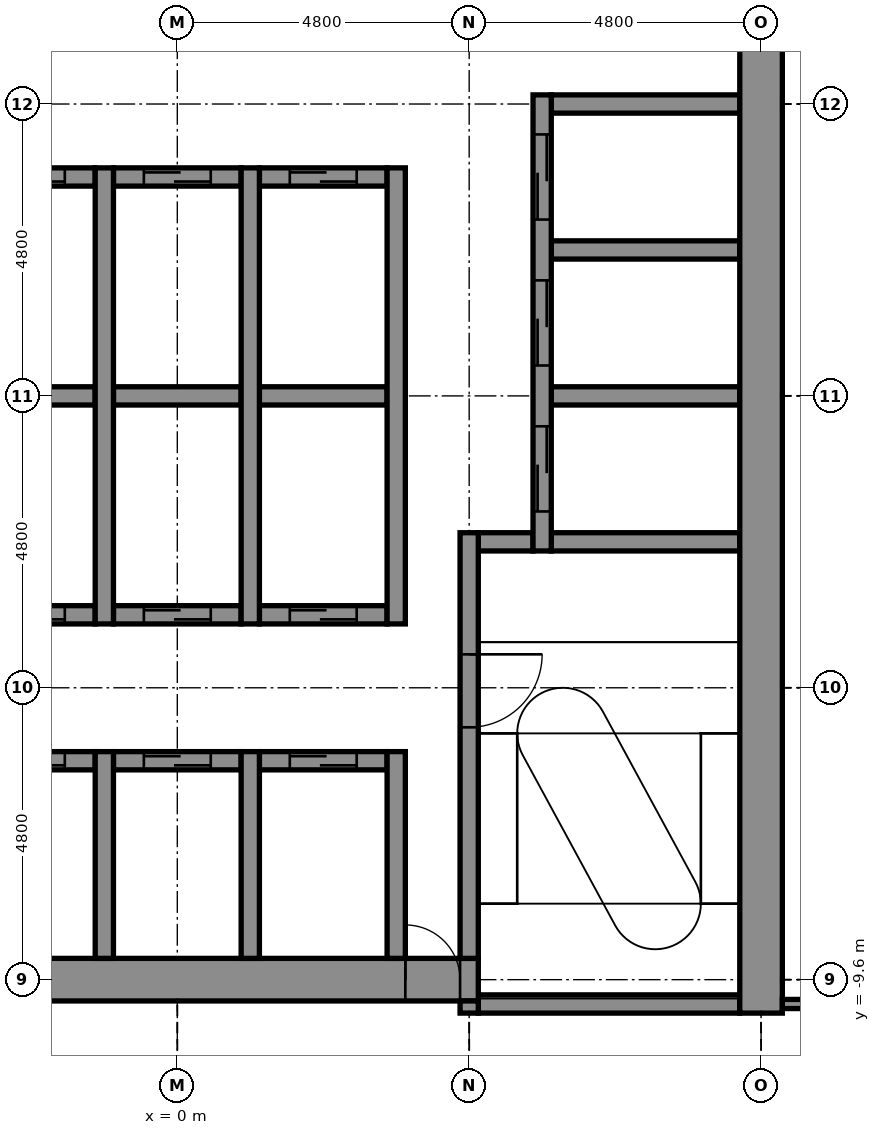
"""IFC4 building model, lengths in metres.
Left out: names, types, materials, properties, quantities, classifications, styles, units other than length and angle.
Written with IfcOpenShell. Run it as: python <this file> out.ifc"""

import sys

from ifc_helpers import new_model, si_unit, direction, frame, frame_2d, origin, place, context, subcontext, project, spatial, rectangle, extrude, element, fill, save


model = new_model("IFC4")
c1 = context("Model", 3, precision=1e-05, world=origin(), true_north=direction((0.0, 1.0)))
c2 = subcontext(c1, "Body", "Model", "MODEL_VIEW")
j1 = project(units=[si_unit("LENGTHUNIT", "METRE"), si_unit("PLANEANGLEUNIT", "RADIAN")], contexts=[c1])
p1 = place(None, origin())
s1 = spatial("IfcSite", under=j1, at=p1, CompositionType="ELEMENT")
p2 = place(p1, origin())
s2 = spatial("IfcBuilding", under=s1, at=p2, CompositionType="ELEMENT")
p3 = place(p2, frame((0.0, 0.0, 166.1)))
s3 = spatial("IfcBuildingStorey", under=s2, at=p3, CompositionType="ELEMENT", Elevation=166.1)
p4 = place(p3, frame((4.95, -10.0, -0.15), z_axis=(0.0, 0.0, 1.0), x_axis=(1.0, 0.0, 0.0)))
e1 = element("IfcWall", 1, at=p4, inside=s3, PredefinedType="STANDARD", context=c2, shape_type="SweptSolid", body=[
    extrude(rectangle(XDim=4.3, YDim=0.3, at=frame_2d((2.15, 0.0))), origin(), (0.0, 0.0, 1.0), 3.9),
])
p5 = place(p3, frame((-5.25, -9.6, -0.15), z_axis=(0.0, 0.0, 1.0), x_axis=(1.0, 0.0, 0.0)))
e2 = element("IfcWall", 2, at=p5, inside=s3, PredefinedType="SHEAR", context=c2, shape_type="SweptSolid", body=[
    extrude(rectangle(XDim=10.2, YDim=0.7, at=frame_2d((5.1, 0.0))), origin(), (0.0, 0.0, 1.0), 3.9),
])
p6 = place(p5, frame((9.0, 0.0, 0.15)))
e3 = element("IfcOpeningElement", 3, at=p6, cuts=e2, PredefinedType="OPENING", context=c2, shape_type="SweptSolid", body=[
    extrude(rectangle(XDim=0.9, YDim=2.1, at=frame_2d((0.45, 1.05))), frame((0.0, 0.36, 0.0), z_axis=(0.0, -1.0, 0.0), x_axis=(1.0, 0.0, 0.0)), (0.0, 0.0, 1.0), 0.72),
])
p7 = place(p3, frame((-3.45, -6.0, -0.15), z_axis=(0.0, 0.0, 1.0), x_axis=(1.0, 0.0, 0.0)))
e4 = element("IfcWall", 4, at=p7, inside=s3, PredefinedType="STANDARD", context=c2, shape_type="SweptSolid", body=[
    extrude(rectangle(XDim=2.1, YDim=0.3, at=frame_2d((1.05, 0.0))), origin(), (0.0, 0.0, 1.0), 3.9),
])
p8 = place(p7, frame((0.5, 0.0, 0.15)))
e5 = element("IfcOpeningElement", 5, at=p8, cuts=e4, PredefinedType="OPENING", context=c2, shape_type="SweptSolid", body=[
    extrude(rectangle(XDim=1.1, YDim=2.1, at=frame_2d((0.55, 1.05))), frame((0.0, 0.16, 0.0), z_axis=(0.0, -1.0, 0.0), x_axis=(1.0, 0.0, 0.0)), (0.0, 0.0, 1.0), 0.32),
])
p9 = place(p3, frame((-1.05, -6.0, -0.15), z_axis=(0.0, 0.0, 1.0), x_axis=(1.0, 0.0, 0.0)))
e6 = element("IfcWall", 6, at=p9, inside=s3, PredefinedType="STANDARD", context=c2, shape_type="SweptSolid", body=[
    extrude(rectangle(XDim=2.1, YDim=0.3, at=frame_2d((1.05, 0.0))), origin(), (0.0, 0.0, 1.0), 3.9),
])
p10 = place(p9, frame((0.5, 0.0, 0.15)))
e7 = element("IfcOpeningElement", 7, at=p10, cuts=e6, PredefinedType="OPENING", context=c2, shape_type="SweptSolid", body=[
    extrude(rectangle(XDim=1.1, YDim=2.1, at=frame_2d((0.55, 1.05))), frame((0.0, 0.16, 0.0), z_axis=(0.0, -1.0, 0.0), x_axis=(1.0, 0.0, 0.0)), (0.0, 0.0, 1.0), 0.32),
])
p11 = place(p3, frame((1.35, -6.0, -0.15), z_axis=(0.0, 0.0, 1.0), x_axis=(1.0, 0.0, 0.0)))
e8 = element("IfcWall", 8, at=p11, inside=s3, PredefinedType="STANDARD", context=c2, shape_type="SweptSolid", body=[
    extrude(rectangle(XDim=2.1, YDim=0.3, at=frame_2d((1.05, 0.0))), origin(), (0.0, 0.0, 1.0), 3.9),
])
p12 = place(p11, frame((0.5, 0.0, 0.15)))
e9 = element("IfcOpeningElement", 9, at=p12, cuts=e8, PredefinedType="OPENING", context=c2, shape_type="SweptSolid", body=[
    extrude(rectangle(XDim=1.1, YDim=2.1, at=frame_2d((0.55, 1.05))), frame((0.0, 0.16, 0.0), z_axis=(0.0, -1.0, 0.0), x_axis=(1.0, 0.0, 0.0)), (0.0, 0.0, 1.0), 0.32),
])
p13 = place(p3, frame((-3.45, -3.6, -0.15), z_axis=(0.0, 0.0, 1.0), x_axis=(1.0, 0.0, 0.0)))
e10 = element("IfcWall", 10, at=p13, inside=s3, PredefinedType="STANDARD", context=c2, shape_type="SweptSolid", body=[
    extrude(rectangle(XDim=2.1, YDim=0.3, at=frame_2d((1.05, 0.0))), origin(), (0.0, 0.0, 1.0), 3.9),
])
p14 = place(p13, frame((0.5, 0.0, 0.15)))
e11 = element("IfcOpeningElement", 11, at=p14, cuts=e10, PredefinedType="OPENING", context=c2, shape_type="SweptSolid", body=[
    extrude(rectangle(XDim=1.1, YDim=2.1, at=frame_2d((0.55, 1.05))), frame((0.0, 0.16, 0.0), z_axis=(0.0, -1.0, 0.0), x_axis=(1.0, 0.0, 0.0)), (0.0, 0.0, 1.0), 0.32),
])
p15 = place(p3, frame((-1.05, -3.6, -0.15), z_axis=(0.0, 0.0, 1.0), x_axis=(1.0, 0.0, 0.0)))
e12 = element("IfcWall", 12, at=p15, inside=s3, PredefinedType="STANDARD", context=c2, shape_type="SweptSolid", body=[
    extrude(rectangle(XDim=2.1, YDim=0.3, at=frame_2d((1.05, 0.0))), origin(), (0.0, 0.0, 1.0), 3.9),
])
p16 = place(p15, frame((0.5, 0.0, 0.15)))
e13 = element("IfcOpeningElement", 13, at=p16, cuts=e12, PredefinedType="OPENING", context=c2, shape_type="SweptSolid", body=[
    extrude(rectangle(XDim=1.1, YDim=2.1, at=frame_2d((0.55, 1.05))), frame((0.0, 0.16, 0.0), z_axis=(0.0, -1.0, 0.0), x_axis=(1.0, 0.0, 0.0)), (0.0, 0.0, 1.0), 0.32),
])
p17 = place(p3, frame((1.35, -3.6, -0.15), z_axis=(0.0, 0.0, 1.0), x_axis=(1.0, 0.0, 0.0)))
e14 = element("IfcWall", 14, at=p17, inside=s3, PredefinedType="STANDARD", context=c2, shape_type="SweptSolid", body=[
    extrude(rectangle(XDim=2.1, YDim=0.3, at=frame_2d((1.05, 0.0))), origin(), (0.0, 0.0, 1.0), 3.9),
])
p18 = place(p17, frame((0.5, 0.0, 0.15)))
e15 = element("IfcOpeningElement", 15, at=p18, cuts=e14, PredefinedType="OPENING", context=c2, shape_type="SweptSolid", body=[
    extrude(rectangle(XDim=1.1, YDim=2.1, at=frame_2d((0.55, 1.05))), frame((0.0, 0.16, 0.0), z_axis=(0.0, -1.0, 0.0), x_axis=(1.0, 0.0, 0.0)), (0.0, 0.0, 1.0), 0.32),
])
p19 = place(p3, frame((4.95, -2.4, -0.15), z_axis=(0.0, 0.0, 1.0), x_axis=(1.0, 0.0, 0.0)))
e16 = element("IfcWall", 16, at=p19, inside=s3, PredefinedType="STANDARD", context=c2, shape_type="SweptSolid", body=[
    extrude(rectangle(XDim=0.9, YDim=0.3, at=frame_2d((0.45, 0.0))), origin(), (0.0, 0.0, 1.0), 3.9),
])
p20 = place(p3, frame((6.15, -2.4, -0.15), z_axis=(0.0, 0.0, 1.0), x_axis=(1.0, 0.0, 0.0)))
e17 = element("IfcWall", 17, at=p20, inside=s3, PredefinedType="STANDARD", context=c2, shape_type="SweptSolid", body=[
    extrude(rectangle(XDim=3.1, YDim=0.3, at=frame_2d((1.55, 0.0))), origin(), (0.0, 0.0, 1.0), 3.9),
])
p21 = place(p3, frame((-3.45, 0.0, -0.15), z_axis=(0.0, 0.0, 1.0), x_axis=(1.0, 0.0, 0.0)))
e18 = element("IfcWall", 18, at=p21, inside=s3, PredefinedType="STANDARD", context=c2, shape_type="SweptSolid", body=[
    extrude(rectangle(XDim=2.1, YDim=0.3, at=frame_2d((1.05, 0.0))), origin(), (0.0, 0.0, 1.0), 3.9),
])
p22 = place(p3, frame((-1.05, 0.0, -0.15), z_axis=(0.0, 0.0, 1.0), x_axis=(1.0, 0.0, 0.0)))
e19 = element("IfcWall", 19, at=p22, inside=s3, PredefinedType="STANDARD", context=c2, shape_type="SweptSolid", body=[
    extrude(rectangle(XDim=2.1, YDim=0.3, at=frame_2d((1.05, 0.0))), origin(), (0.0, 0.0, 1.0), 3.9),
])
p23 = place(p3, frame((1.35, 0.0, -0.15), z_axis=(0.0, 0.0, 1.0), x_axis=(1.0, 0.0, 0.0)))
e20 = element("IfcWall", 20, at=p23, inside=s3, PredefinedType="STANDARD", context=c2, shape_type="SweptSolid", body=[
    extrude(rectangle(XDim=2.1, YDim=0.3, at=frame_2d((1.05, 0.0))), origin(), (0.0, 0.0, 1.0), 3.9),
])
for number, where, z_axis, x_axis in (
    (21, (6.15, 0.0, -0.15), (0.0, 0.0, 1.0), (1.0, 0.0, 0.0)),
    (22, (6.15, 2.4, -0.15), (0.0, 0.0, 1.0), (1.0, 0.0, 0.0)),
):
    element("IfcWall", number, at=place(p3, frame(where, z_axis=z_axis, x_axis=x_axis)), inside=s3, PredefinedType="STANDARD", context=c2, shape_type="SweptSolid", body=[
        extrude(rectangle(XDim=3.1, YDim=0.3, at=frame_2d((1.55, 0.0))), origin(), (0.0, 0.0, 1.0), 3.9),
    ])
p24 = place(p3, frame((-3.45, 3.6, -0.15), z_axis=(0.0, 0.0, 1.0), x_axis=(1.0, 0.0, 0.0)))
e23 = element("IfcWall", 23, at=p24, inside=s3, PredefinedType="STANDARD", context=c2, shape_type="SweptSolid", body=[
    extrude(rectangle(XDim=2.1, YDim=0.3, at=frame_2d((1.05, 0.0))), origin(), (0.0, 0.0, 1.0), 3.9),
])
p25 = place(p24, frame((0.5, 0.0, 0.15)))
e24 = element("IfcOpeningElement", 24, at=p25, cuts=e23, PredefinedType="OPENING", context=c2, shape_type="SweptSolid", body=[
    extrude(rectangle(XDim=1.1, YDim=2.1, at=frame_2d((0.55, 1.05))), frame((0.0, 0.16, 0.0), z_axis=(0.0, -1.0, 0.0), x_axis=(1.0, 0.0, 0.0)), (0.0, 0.0, 1.0), 0.32),
])
p26 = place(p3, frame((-1.05, 3.6, -0.15), z_axis=(0.0, 0.0, 1.0), x_axis=(1.0, 0.0, 0.0)))
e25 = element("IfcWall", 25, at=p26, inside=s3, PredefinedType="STANDARD", context=c2, shape_type="SweptSolid", body=[
    extrude(rectangle(XDim=2.1, YDim=0.3, at=frame_2d((1.05, 0.0))), origin(), (0.0, 0.0, 1.0), 3.9),
])
p27 = place(p26, frame((0.5, 0.0, 0.15)))
e26 = element("IfcOpeningElement", 26, at=p27, cuts=e25, PredefinedType="OPENING", context=c2, shape_type="SweptSolid", body=[
    extrude(rectangle(XDim=1.1, YDim=2.1, at=frame_2d((0.55, 1.05))), frame((0.0, 0.16, 0.0), z_axis=(0.0, -1.0, 0.0), x_axis=(1.0, 0.0, 0.0)), (0.0, 0.0, 1.0), 0.32),
])
p28 = place(p3, frame((1.35, 3.6, -0.15), z_axis=(0.0, 0.0, 1.0), x_axis=(1.0, 0.0, 0.0)))
e27 = element("IfcWall", 27, at=p28, inside=s3, PredefinedType="STANDARD", context=c2, shape_type="SweptSolid", body=[
    extrude(rectangle(XDim=2.1, YDim=0.3, at=frame_2d((1.05, 0.0))), origin(), (0.0, 0.0, 1.0), 3.9),
])
p29 = place(p28, frame((0.5, 0.0, 0.15)))
e28 = element("IfcOpeningElement", 28, at=p29, cuts=e27, PredefinedType="OPENING", context=c2, shape_type="SweptSolid", body=[
    extrude(rectangle(XDim=1.1, YDim=2.1, at=frame_2d((0.55, 1.05))), frame((0.0, 0.16, 0.0), z_axis=(0.0, -1.0, 0.0), x_axis=(1.0, 0.0, 0.0)), (0.0, 0.0, 1.0), 0.32),
])
p30 = place(p3, frame((6.15, 4.8, -0.15), z_axis=(0.0, 0.0, 1.0), x_axis=(1.0, 0.0, 0.0)))
e29 = element("IfcWall", 29, at=p30, inside=s3, PredefinedType="STANDARD", context=c2, shape_type="SweptSolid", body=[
    extrude(rectangle(XDim=3.1, YDim=0.3, at=frame_2d((1.55, 0.0))), origin(), (0.0, 0.0, 1.0), 3.9),
])
p31 = place(p3, frame((-1.2, -9.25, -0.15), z_axis=(0.0, 0.0, 1.0), x_axis=(0.0, 1.0, 0.0)))
e30 = element("IfcWall", 30, at=p31, inside=s3, PredefinedType="STANDARD", context=c2, shape_type="SweptSolid", body=[
    extrude(rectangle(XDim=3.4, YDim=0.3, at=frame_2d((1.7, 0.0))), origin(), (0.0, 0.0, 1.0), 3.9),
])
p32 = place(p3, frame((-1.2, -3.75, -0.15), z_axis=(0.0, 0.0, 1.0), x_axis=(0.0, 1.0, 0.0)))
e31 = element("IfcWall", 31, at=p32, inside=s3, PredefinedType="STANDARD", context=c2, shape_type="SweptSolid", body=[
    extrude(rectangle(XDim=7.5, YDim=0.3, at=frame_2d((3.75, 0.0))), origin(), (0.0, 0.0, 1.0), 3.9),
])
p33 = place(p3, frame((1.2, -9.25, -0.15), z_axis=(0.0, 0.0, 1.0), x_axis=(0.0, 1.0, 0.0)))
e32 = element("IfcWall", 32, at=p33, inside=s3, PredefinedType="STANDARD", context=c2, shape_type="SweptSolid", body=[
    extrude(rectangle(XDim=3.4, YDim=0.3, at=frame_2d((1.7, 0.0))), origin(), (0.0, 0.0, 1.0), 3.9),
])
p34 = place(p3, frame((1.2, -3.75, -0.15), z_axis=(0.0, 0.0, 1.0), x_axis=(0.0, 1.0, 0.0)))
e33 = element("IfcWall", 33, at=p34, inside=s3, PredefinedType="STANDARD", context=c2, shape_type="SweptSolid", body=[
    extrude(rectangle(XDim=7.5, YDim=0.3, at=frame_2d((3.75, 0.0))), origin(), (0.0, 0.0, 1.0), 3.9),
])
p35 = place(p3, frame((3.6, -9.25, -0.15), z_axis=(0.0, 0.0, 1.0), x_axis=(0.0, 1.0, 0.0)))
e34 = element("IfcWall", 34, at=p35, inside=s3, PredefinedType="STANDARD", context=c2, shape_type="SweptSolid", body=[
    extrude(rectangle(XDim=3.4, YDim=0.3, at=frame_2d((1.7, 0.0))), origin(), (0.0, 0.0, 1.0), 3.9),
])
p36 = place(p3, frame((3.6, -3.75, -0.15), z_axis=(0.0, 0.0, 1.0), x_axis=(0.0, 1.0, 0.0)))
e35 = element("IfcWall", 35, at=p36, inside=s3, PredefinedType="STANDARD", context=c2, shape_type="SweptSolid", body=[
    extrude(rectangle(XDim=7.5, YDim=0.3, at=frame_2d((3.75, 0.0))), origin(), (0.0, 0.0, 1.0), 3.9),
])
p37 = place(p3, frame((4.8, -10.15, -0.15), z_axis=(0.0, 0.0, 1.0), x_axis=(0.0, 1.0, 0.0)))
e36 = element("IfcWall", 36, at=p37, inside=s3, PredefinedType="STANDARD", context=c2, shape_type="SweptSolid", body=[
    extrude(rectangle(XDim=0.2, YDim=0.3, at=frame_2d((0.1, 0.0))), origin(), (0.0, 0.0, 1.0), 3.9),
])
p38 = place(p3, frame((4.8, -9.25, -0.15), z_axis=(0.0, 0.0, 1.0), x_axis=(0.0, 1.0, 0.0)))
e37 = element("IfcWall", 37, at=p38, inside=s3, PredefinedType="STANDARD", context=c2, shape_type="SweptSolid", body=[
    extrude(rectangle(XDim=7.0, YDim=0.3, at=frame_2d((3.5, 0.0))), origin(), (0.0, 0.0, 1.0), 3.9),
])
p39 = place(p38, frame((3.8, 0.0, 0.15)))
e38 = element("IfcOpeningElement", 38, at=p39, cuts=e37, PredefinedType="OPENING", context=c2, shape_type="SweptSolid", body=[
    extrude(rectangle(XDim=1.2, YDim=2.1, at=frame_2d((0.6, 1.05))), frame((0.0, 0.16, 0.0), z_axis=(0.0, -1.0, 0.0), x_axis=(1.0, 0.0, 0.0)), (0.0, 0.0, 1.0), 0.32),
])
p40 = place(p3, frame((6.0, -2.55, -0.15), z_axis=(0.0, 0.0, 1.0), x_axis=(0.0, 1.0, 0.0)))
e39 = element("IfcWall", 39, at=p40, inside=s3, PredefinedType="STANDARD", context=c2, shape_type="SweptSolid", body=[
    extrude(rectangle(XDim=7.5, YDim=0.3, at=frame_2d((3.75, 0.0))), origin(), (0.0, 0.0, 1.0), 3.9),
])
p41 = place(p40, frame((0.65, 0.0, 0.15)))
e40 = element("IfcOpeningElement", 40, at=p41, cuts=e39, PredefinedType="OPENING", context=c2, shape_type="SweptSolid", body=[
    extrude(rectangle(XDim=1.4, YDim=2.1, at=frame_2d((0.7, 1.05))), frame((0.0, 0.16, 0.0), z_axis=(0.0, -1.0, 0.0), x_axis=(1.0, 0.0, 0.0)), (0.0, 0.0, 1.0), 0.32),
])
p42 = place(p40, frame((3.05, 0.0, 0.15)))
e41 = element("IfcOpeningElement", 41, at=p42, cuts=e39, PredefinedType="OPENING", context=c2, shape_type="SweptSolid", body=[
    extrude(rectangle(XDim=1.4, YDim=2.1, at=frame_2d((0.7, 1.05))), frame((0.0, 0.16, 0.0), z_axis=(0.0, -1.0, 0.0), x_axis=(1.0, 0.0, 0.0)), (0.0, 0.0, 1.0), 0.32),
])
p43 = place(p40, frame((5.45, 0.0, 0.15)))
e42 = element("IfcOpeningElement", 42, at=p43, cuts=e39, PredefinedType="OPENING", context=c2, shape_type="SweptSolid", body=[
    extrude(rectangle(XDim=1.4, YDim=2.1, at=frame_2d((0.7, 1.05))), frame((0.0, 0.16, 0.0), z_axis=(0.0, -1.0, 0.0), x_axis=(1.0, 0.0, 0.0)), (0.0, 0.0, 1.0), 0.32),
])
p44 = place(p3, frame((9.6, -10.15, -0.15), z_axis=(0.0, 0.0, 1.0), x_axis=(0.0, 1.0, 0.0)))
e43 = element("IfcWall", 43, at=p44, inside=s3, PredefinedType="SHEAR", context=c2, shape_type="SweptSolid", body=[
    extrude(rectangle(XDim=20.1, YDim=0.7, at=frame_2d((10.05, 0.0))), origin(), (0.0, 0.0, 1.0), 3.9),
])
p45 = place(p3, frame((9.95, -10.0, 0.0), z_axis=(0.0, 0.0, 1.0), x_axis=(1.0, 0.0, 0.0)))
e44 = element("IfcWall", 44, at=p45, inside=s3, PredefinedType="PARTITIONING", context=c2, shape_type="SweptSolid", body=[
    extrude(rectangle(XDim=9.405, YDim=0.15, at=frame_2d((4.702, 0.0))), origin(), (0.0, 0.0, 1.0), 3.75),
])
p46 = place(p45, frame((2.569, 0.0, 0.0)))
e45 = element("IfcOpeningElement", 45, at=p46, cuts=e44, PredefinedType="OPENING", context=c2, shape_type="SweptSolid", body=[
    extrude(rectangle(XDim=1.8, YDim=2.1, at=frame_2d((0.9, 1.05))), frame((0.0, 0.085, 0.0), z_axis=(0.0, -1.0, 0.0), x_axis=(1.0, 0.0, 0.0)), (0.0, 0.0, 1.0), 0.17),
])
p47 = place(p41, origin())
e46 = element("IfcDoor", 46, at=p47, inside=s3, OperationType="DOUBLE_DOOR_SLIDING", PredefinedType="DOOR", context=c2, shape_type="SweptSolid", body=[
    extrude(rectangle(XDim=1.4, YDim=2.1, at=frame_2d((0.7, 1.05))), frame((0.0, 0.025, 0.0), z_axis=(0.0, -1.0, 0.0), x_axis=(1.0, 0.0, 0.0)), (0.0, 0.0, 1.0), 0.05),
])
fill(e40, e46)
p48 = place(p42, origin())
e47 = element("IfcDoor", 47, at=p48, inside=s3, OperationType="DOUBLE_DOOR_SLIDING", PredefinedType="DOOR", context=c2, shape_type="SweptSolid", body=[
    extrude(rectangle(XDim=1.4, YDim=2.1, at=frame_2d((0.7, 1.05))), frame((0.0, 0.025, 0.0), z_axis=(0.0, -1.0, 0.0), x_axis=(1.0, 0.0, 0.0)), (0.0, 0.0, 1.0), 0.05),
])
fill(e41, e47)
p49 = place(p43, origin())
e48 = element("IfcDoor", 48, at=p49, inside=s3, OperationType="DOUBLE_DOOR_SLIDING", PredefinedType="DOOR", context=c2, shape_type="SweptSolid", body=[
    extrude(rectangle(XDim=1.4, YDim=2.1, at=frame_2d((0.7, 1.05))), frame((0.0, 0.025, 0.0), z_axis=(0.0, -1.0, 0.0), x_axis=(1.0, 0.0, 0.0)), (0.0, 0.0, 1.0), 0.05),
])
fill(e42, e48)
p50 = place(p25, origin())
e49 = element("IfcDoor", 49, at=p50, inside=s3, OperationType="DOUBLE_DOOR_SLIDING", PredefinedType="DOOR", context=c2, shape_type="SweptSolid", body=[
    extrude(rectangle(XDim=1.1, YDim=2.1, at=frame_2d((0.55, 1.05))), frame((0.0, 0.025, 0.0), z_axis=(0.0, -1.0, 0.0), x_axis=(1.0, 0.0, 0.0)), (0.0, 0.0, 1.0), 0.05),
])
fill(e24, e49)
p51 = place(p27, origin())
e50 = element("IfcDoor", 50, at=p51, inside=s3, OperationType="DOUBLE_DOOR_SLIDING", PredefinedType="DOOR", context=c2, shape_type="SweptSolid", body=[
    extrude(rectangle(XDim=1.1, YDim=2.1, at=frame_2d((0.55, 1.05))), frame((0.0, 0.025, 0.0), z_axis=(0.0, -1.0, 0.0), x_axis=(1.0, 0.0, 0.0)), (0.0, 0.0, 1.0), 0.05),
])
fill(e26, e50)
p52 = place(p29, origin())
e51 = element("IfcDoor", 51, at=p52, inside=s3, OperationType="DOUBLE_DOOR_SLIDING", PredefinedType="DOOR", context=c2, shape_type="SweptSolid", body=[
    extrude(rectangle(XDim=1.1, YDim=2.1, at=frame_2d((0.55, 1.05))), frame((0.0, 0.025, 0.0), z_axis=(0.0, -1.0, 0.0), x_axis=(1.0, 0.0, 0.0)), (0.0, 0.0, 1.0), 0.05),
])
fill(e28, e51)
p53 = place(p14, origin())
e52 = element("IfcDoor", 52, at=p53, inside=s3, OperationType="DOUBLE_DOOR_SLIDING", PredefinedType="DOOR", context=c2, shape_type="SweptSolid", body=[
    extrude(rectangle(XDim=1.1, YDim=2.1, at=frame_2d((0.55, 1.05))), frame((0.0, 0.025, 0.0), z_axis=(0.0, -1.0, 0.0), x_axis=(1.0, 0.0, 0.0)), (0.0, 0.0, 1.0), 0.05),
])
fill(e11, e52)
p54 = place(p16, origin())
e53 = element("IfcDoor", 53, at=p54, inside=s3, OperationType="DOUBLE_DOOR_SLIDING", PredefinedType="DOOR", context=c2, shape_type="SweptSolid", body=[
    extrude(rectangle(XDim=1.1, YDim=2.1, at=frame_2d((0.55, 1.05))), frame((0.0, 0.025, 0.0), z_axis=(0.0, -1.0, 0.0), x_axis=(1.0, 0.0, 0.0)), (0.0, 0.0, 1.0), 0.05),
])
fill(e13, e53)
p55 = place(p18, origin())
e54 = element("IfcDoor", 54, at=p55, inside=s3, OperationType="DOUBLE_DOOR_SLIDING", PredefinedType="DOOR", context=c2, shape_type="SweptSolid", body=[
    extrude(rectangle(XDim=1.1, YDim=2.1, at=frame_2d((0.55, 1.05))), frame((0.0, 0.025, 0.0), z_axis=(0.0, -1.0, 0.0), x_axis=(1.0, 0.0, 0.0)), (0.0, 0.0, 1.0), 0.05),
])
fill(e15, e54)
p56 = place(p8, origin())
e55 = element("IfcDoor", 55, at=p56, inside=s3, OperationType="DOUBLE_DOOR_SLIDING", PredefinedType="DOOR", context=c2, shape_type="SweptSolid", body=[
    extrude(rectangle(XDim=1.1, YDim=2.1, at=frame_2d((0.55, 1.05))), frame((0.0, 0.025, 0.0), z_axis=(0.0, -1.0, 0.0), x_axis=(1.0, 0.0, 0.0)), (0.0, 0.0, 1.0), 0.05),
])
fill(e5, e55)
p57 = place(p10, origin())
e56 = element("IfcDoor", 56, at=p57, inside=s3, OperationType="DOUBLE_DOOR_SLIDING", PredefinedType="DOOR", context=c2, shape_type="SweptSolid", body=[
    extrude(rectangle(XDim=1.1, YDim=2.1, at=frame_2d((0.55, 1.05))), frame((0.0, 0.025, 0.0), z_axis=(0.0, -1.0, 0.0), x_axis=(1.0, 0.0, 0.0)), (0.0, 0.0, 1.0), 0.05),
])
fill(e7, e56)
p58 = place(p12, origin())
e57 = element("IfcDoor", 57, at=p58, inside=s3, OperationType="DOUBLE_DOOR_SLIDING", PredefinedType="DOOR", context=c2, shape_type="SweptSolid", body=[
    extrude(rectangle(XDim=1.1, YDim=2.1, at=frame_2d((0.55, 1.05))), frame((0.0, 0.025, 0.0), z_axis=(0.0, -1.0, 0.0), x_axis=(1.0, 0.0, 0.0)), (0.0, 0.0, 1.0), 0.05),
])
fill(e9, e57)
p59 = place(p39, frame((1.2, 0.0, 0.0), z_axis=(0.0, 0.0, 1.0), x_axis=(-1.0, 0.0, 0.0)))
e58 = element("IfcDoor", 58, at=p59, inside=s3, OperationType="SINGLE_SWING_RIGHT", PredefinedType="DOOR", context=c2, shape_type="SweptSolid", body=[
    extrude(rectangle(XDim=1.2, YDim=2.1, at=frame_2d((0.6, 1.05))), frame((0.0, 0.025, 0.0), z_axis=(0.0, -1.0, 0.0), x_axis=(1.0, 0.0, 0.0)), (0.0, 0.0, 1.0), 0.05),
])
fill(e38, e58)
p60 = place(p6, origin())
e59 = element("IfcDoor", 59, at=p60, inside=s3, OperationType="SINGLE_SWING_LEFT", PredefinedType="DOOR", context=c2, shape_type="SweptSolid", body=[
    extrude(rectangle(XDim=0.9, YDim=2.1, at=frame_2d((0.45, 1.05))), frame((0.0, 0.025, 0.0), z_axis=(0.0, -1.0, 0.0), x_axis=(1.0, 0.0, 0.0)), (0.0, 0.0, 1.0), 0.05),
])
fill(e3, e59)
save(model, sys.argv[1])
